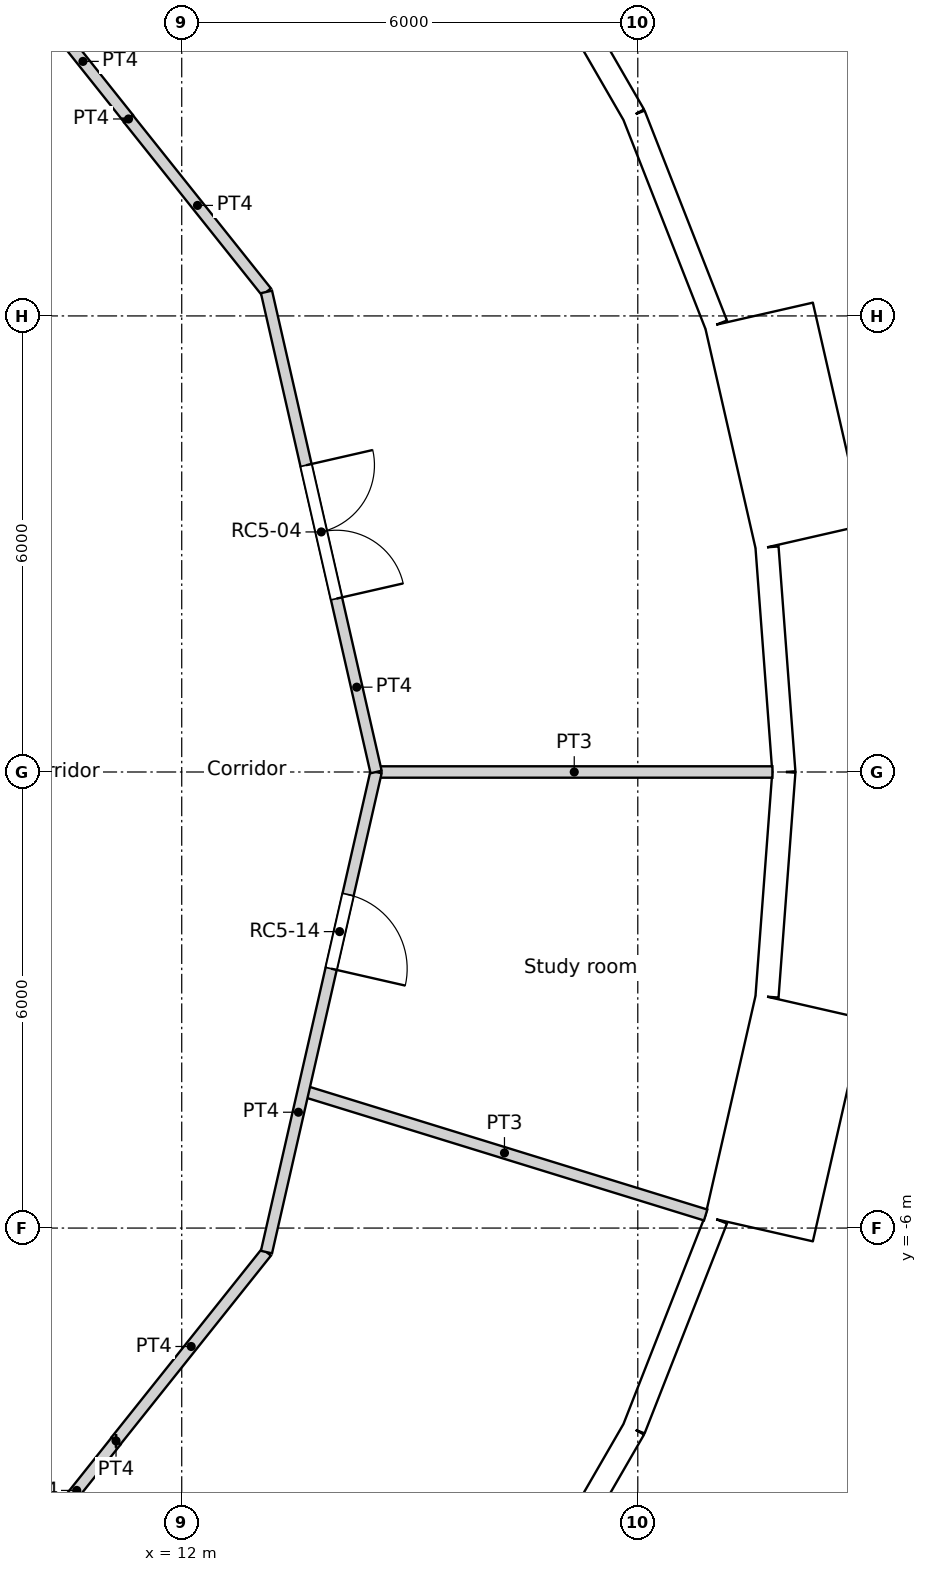
"""IFC4 building model, lengths in metres.
Left out: names, types, materials, properties, quantities, classifications, styles, units other than length and angle.
Written with IfcOpenShell. Run it as: python <this file> out.ifc"""

import sys

from ifc_helpers import new_model, si_unit, direction, frame, frame_2d, origin, origin_2d, place, context, subcontext, project, spatial, rectangle, circle, extrude, element, fill, save


model = new_model("IFC4")
c1 = context("Model", 3, precision=1e-05, world=origin(), true_north=direction((0.0, 1.0)))
c2 = subcontext(c1, "Body", "Model", "MODEL_VIEW")
j1 = project(units=[si_unit("LENGTHUNIT", "METRE"), si_unit("PLANEANGLEUNIT", "RADIAN")], contexts=[c1])
p1 = place(None, origin())
s1 = spatial("IfcSite", under=j1, at=p1, CompositionType="ELEMENT")
p2 = place(p1, origin())
s2 = spatial("IfcBuilding", under=s1, at=p2, CompositionType="ELEMENT")
p3 = place(p2, frame((0.0, 0.0, 270.6)))
s3 = spatial("IfcBuildingStorey", under=s2, at=p3, CompositionType="ELEMENT", Elevation=270.6)
for number, where, z_axis, x_axis in (
    (1, (18.822, 0.0, 0.0), (0.0, 0.0, 1.0), (1.0, 0.0, 0.0)),
    (2, (17.986, 5.548, 0.0), (0.0, 0.0, 1.0), (1.0, 0.0, 0.0)),
    (3, (17.986, -5.548, 0.0), (0.0, 0.0, 1.0), (1.0, 0.0, 0.0)),
):
    element("IfcColumn", number, at=place(p3, frame(where, z_axis=z_axis, x_axis=x_axis)), inside=s3, PredefinedType="COLUMN", context=c2, shape_type="SweptSolid", body=[
        extrude(circle(Radius=0.55, at=origin_2d()), origin(), (0.0, 0.0, 1.0), 3.6),
    ])
p4 = place(p3, frame((19.922, 0.0, 0.0), z_axis=(0.0, 0.0, 1.0), x_axis=(-0.074755115547, 0.997201921729, 0.0)))
e4 = element("IfcWall", 4, at=p4, inside=s3, PredefinedType="SOLIDWALL", context=c2, shape_type="SweptSolid", body=[
    extrude(rectangle(XDim=2.962, YDim=0.3, at=frame_2d((1.481, 0.0))), origin(), (0.0, 0.0, 1.0), 3.25),
])
p5 = place(p4, frame((1.481, 0.0, 1.55)))
e5 = element("IfcOpeningElement", 5, at=p5, cuts=e4, PredefinedType="OPENING", context=c2, shape_type="SweptSolid", body=[
    extrude(circle(Radius=0.9, at=origin_2d()), frame((0.0, 0.16, 0.0), z_axis=(0.0, -1.0, 0.0), x_axis=(1.0, 0.0, 0.0)), (0.0, 0.0, 1.0), 0.32),
])
p6 = place(p3, frame((20.262, 3.086, -0.35), z_axis=(0.0, 0.0, 1.0), x_axis=(-0.222570682856, 0.974916555985, 0.0)))
e6 = element("IfcWall", 6, at=p6, inside=s3, PredefinedType="ELEMENTEDWALL", context=c2, shape_type="SweptSolid", body=[
    extrude(rectangle(XDim=3.0, YDim=1.45, at=frame_2d((1.5, 0.0))), origin(), (0.0, 0.0, 1.0), 3.6),
])
p7 = place(p6, frame((1.5, 0.0, 1.9)))
e7 = element("IfcOpeningElement", 7, at=p7, cuts=e6, PredefinedType="OPENING", context=c2, shape_type="SweptSolid", body=[
    extrude(circle(Radius=0.9, at=origin_2d()), frame((0.0, 0.735, 0.0), z_axis=(0.0, -1.0, 0.0), x_axis=(1.0, 0.0, 0.0)), (0.0, 0.0, 1.0), 1.47),
])
p8 = place(p3, frame((19.031, 5.886, 0.0), z_axis=(0.0, 0.0, 1.0), x_axis=(-0.365343821297, 0.930872650925, 0.0)))
e8 = element("IfcWall", 8, at=p8, inside=s3, PredefinedType="SOLIDWALL", context=c2, shape_type="SweptSolid", body=[
    extrude(rectangle(XDim=2.962, YDim=0.3, at=frame_2d((1.481, 0.0))), origin(), (0.0, 0.0, 1.0), 3.25),
])
p9 = place(p8, frame((1.481, 0.0, 1.55)))
e9 = element("IfcOpeningElement", 9, at=p9, cuts=e8, PredefinedType="OPENING", context=c2, shape_type="SweptSolid", body=[
    extrude(circle(Radius=0.9, at=origin_2d()), frame((0.0, 0.16, 0.0), z_axis=(0.0, -1.0, 0.0), x_axis=(1.0, 0.0, 0.0)), (0.0, 0.0, 1.0), 0.32),
])
p10 = place(p3, frame((17.949, 8.644, 0.0), z_axis=(0.0, 0.0, 1.0), x_axis=(-0.500012570604, 0.866018146021, 0.0)))
e10 = element("IfcWall", 10, at=p10, inside=s3, PredefinedType="SOLIDWALL", context=c2, shape_type="SweptSolid", body=[
    extrude(rectangle(XDim=2.962, YDim=0.3, at=frame_2d((1.481, 0.0))), origin(), (0.0, 0.0, 1.0), 3.25),
])
p11 = place(p10, frame((1.481, 0.0, 1.55)))
e11 = element("IfcOpeningElement", 11, at=p11, cuts=e10, PredefinedType="OPENING", context=c2, shape_type="SweptSolid", body=[
    extrude(circle(Radius=0.9, at=origin_2d()), frame((0.0, 0.16, 0.0), z_axis=(0.0, -1.0, 0.0), x_axis=(1.0, 0.0, 0.0)), (0.0, 0.0, 1.0), 0.32),
])
p12 = place(p3, frame((16.468, -11.209, 0.0), z_axis=(0.0, 0.0, 1.0), x_axis=(0.500012570604, 0.866018146021, 0.0)))
e12 = element("IfcWall", 12, at=p12, inside=s3, PredefinedType="SOLIDWALL", context=c2, shape_type="SweptSolid", body=[
    extrude(rectangle(XDim=2.962, YDim=0.3, at=frame_2d((1.481, 0.0))), origin(), (0.0, 0.0, 1.0), 3.25),
])
p13 = place(p12, frame((1.481, 0.0, 1.55)))
e13 = element("IfcOpeningElement", 13, at=p13, cuts=e12, PredefinedType="OPENING", context=c2, shape_type="SweptSolid", body=[
    extrude(circle(Radius=0.9, at=origin_2d()), frame((0.0, 0.16, 0.0), z_axis=(0.0, -1.0, 0.0), x_axis=(1.0, 0.0, 0.0)), (0.0, 0.0, 1.0), 0.32),
])
p14 = place(p3, frame((17.949, -8.644, 0.0), z_axis=(0.0, 0.0, 1.0), x_axis=(0.365343821297, 0.930872650925, 0.0)))
e14 = element("IfcWall", 14, at=p14, inside=s3, PredefinedType="SOLIDWALL", context=c2, shape_type="SweptSolid", body=[
    extrude(rectangle(XDim=2.962, YDim=0.3, at=frame_2d((1.481, 0.0))), origin(), (0.0, 0.0, 1.0), 3.25),
])
p15 = place(p14, frame((1.481, 0.0, 1.55)))
e15 = element("IfcOpeningElement", 15, at=p15, cuts=e14, PredefinedType="OPENING", context=c2, shape_type="SweptSolid", body=[
    extrude(circle(Radius=0.9, at=origin_2d()), frame((0.0, 0.16, 0.0), z_axis=(0.0, -1.0, 0.0), x_axis=(1.0, 0.0, 0.0)), (0.0, 0.0, 1.0), 0.32),
])
p16 = place(p3, frame((19.595, -6.011, -0.35), z_axis=(0.0, 0.0, 1.0), x_axis=(0.222570682856, 0.974916555985, 0.0)))
e16 = element("IfcWall", 16, at=p16, inside=s3, PredefinedType="ELEMENTEDWALL", context=c2, shape_type="SweptSolid", body=[
    extrude(rectangle(XDim=3.0, YDim=1.45, at=frame_2d((1.5, 0.0))), origin(), (0.0, 0.0, 1.0), 3.6),
])
p17 = place(p16, frame((1.5, 0.0, 1.9)))
e17 = element("IfcOpeningElement", 17, at=p17, cuts=e16, PredefinedType="OPENING", context=c2, shape_type="SweptSolid", body=[
    extrude(circle(Radius=0.9, at=origin_2d()), frame((0.0, 0.735, 0.0), z_axis=(0.0, -1.0, 0.0), x_axis=(1.0, 0.0, 0.0)), (0.0, 0.0, 1.0), 1.47),
])
p18 = place(p3, frame((19.7, -2.954, 0.0), z_axis=(0.0, 0.0, 1.0), x_axis=(0.074755115547, 0.997201921729, 0.0)))
e18 = element("IfcWall", 18, at=p18, inside=s3, PredefinedType="SOLIDWALL", context=c2, shape_type="SweptSolid", body=[
    extrude(rectangle(XDim=2.962, YDim=0.3, at=frame_2d((1.481, 0.0))), origin(), (0.0, 0.0, 1.0), 3.25),
])
p19 = place(p18, frame((1.481, 0.0, 1.55)))
e19 = element("IfcOpeningElement", 19, at=p19, cuts=e18, PredefinedType="OPENING", context=c2, shape_type="SweptSolid", body=[
    extrude(circle(Radius=0.9, at=origin_2d()), frame((0.0, 0.16, 0.0), z_axis=(0.0, -1.0, 0.0), x_axis=(1.0, 0.0, 0.0)), (0.0, 0.0, 1.0), 0.32),
])
p20 = place(p3, frame((10.101, 10.101, 0.0), z_axis=(0.0, 0.0, 1.0), x_axis=(0.623130947784, -0.782117524362, 0.0)))
e20 = element("IfcWall", 20, at=p20, inside=s3, PredefinedType="PARTITIONING", context=c2, shape_type="SweptSolid", body=[
    extrude(rectangle(XDim=1.924, YDim=0.15, at=frame_2d((0.962, 0.0))), origin(), (0.0, 0.0, 1.0), 3.1),
])
p21 = place(p3, frame((11.3, 8.586, 0.0), z_axis=(0.0, 0.0, 1.0), x_axis=(0.0, 1.0, 0.0)))
e21 = element("IfcWall", 21, at=p21, inside=s3, PredefinedType="PARTITIONING", context=c2, shape_type="SweptSolid", body=[
    extrude(rectangle(XDim=0.01, YDim=0.15, at=frame_2d((0.005, 0.0))), origin(), (0.0, 0.0, 1.0), 3.1),
])
p22 = place(p3, frame((11.137, -8.8, 0.0), z_axis=(0.0, 0.0, 1.0), x_axis=(-1.0, 0.0, 0.0)))
e22 = element("IfcWall", 22, at=p22, inside=s3, PredefinedType="PARTITIONING", context=c2, shape_type="SweptSolid", body=[
    extrude(rectangle(XDim=0.003, YDim=0.15, at=frame_2d((0.001, 0.0))), origin(), (0.0, 0.0, 1.0), 3.1),
])
p23 = place(p3, frame((10.101, -10.101, 0.0), z_axis=(0.0, 0.0, 1.0), x_axis=(0.623098344652, 0.782143498913, 0.0)))
e23 = element("IfcWall", 23, at=p23, inside=s3, PredefinedType="PARTITIONING", context=c2, shape_type="SweptSolid", body=[
    extrude(rectangle(XDim=1.661, YDim=0.15, at=frame_2d((0.831, 0.0))), origin(), (0.0, 0.0, 1.0), 3.1),
])
p24 = place(p3, frame((11.3, 8.592, 0.0), z_axis=(0.0, 0.0, 1.0), x_axis=(0.623446514299, -0.781866001185, 0.0)))
e24 = element("IfcWall", 24, at=p24, inside=s3, PredefinedType="PARTITIONING", context=c2, shape_type="SweptSolid", body=[
    extrude(rectangle(XDim=2.911, YDim=0.15, at=frame_2d((1.456, 0.0))), origin(), (0.0, 0.0, 1.0), 3.1),
])
p25 = place(p3, frame((13.115, 6.316, 0.0), z_axis=(0.0, 0.0, 1.0), x_axis=(0.222568978642, -0.97491694505, 0.0)))
e25 = element("IfcWall", 25, at=p25, inside=s3, PredefinedType="PARTITIONING", context=c2, shape_type="SweptSolid", body=[
    extrude(rectangle(XDim=6.479, YDim=0.15, at=frame_2d((3.239, 0.0))), origin(), (0.0, 0.0, 1.0), 3.1),
])
p26 = place(p25, frame((2.339, 0.0, 0.0)))
e26 = element("IfcOpeningElement", 26, at=p26, cuts=e25, PredefinedType="OPENING", context=c2, shape_type="SweptSolid", body=[
    extrude(rectangle(XDim=1.8, YDim=2.1, at=frame_2d((0.9, 1.05))), frame((0.0, 0.075, 0.0), z_axis=(0.0, -1.0, 0.0), x_axis=(1.0, 0.0, 0.0)), (0.0, 0.0, 1.0), 0.15),
])
p27 = place(p3, frame((13.115, -6.316, 0.0), z_axis=(0.0, 0.0, 1.0), x_axis=(0.222533159771, 0.974925121639, 0.0)))
e27 = element("IfcWall", 27, at=p27, inside=s3, PredefinedType="PARTITIONING", context=c2, shape_type="SweptSolid", body=[
    extrude(rectangle(XDim=6.478, YDim=0.15, at=frame_2d((3.239, 0.0))), origin(), (0.0, 0.0, 1.0), 3.1),
])
p28 = place(p27, frame((3.824, 0.0, 0.0)))
e28 = element("IfcOpeningElement", 28, at=p28, cuts=e27, PredefinedType="OPENING", context=c2, shape_type="SweptSolid", body=[
    extrude(rectangle(XDim=1.0, YDim=2.04, at=frame_2d((0.5, 1.02))), frame((0.0, 0.075, 0.0), z_axis=(0.0, -1.0, 0.0), x_axis=(1.0, 0.0, 0.0)), (0.0, 0.0, 1.0), 0.15),
])
p29 = place(p3, frame((11.134, -8.8, 0.0), z_axis=(0.0, 0.0, 1.0), x_axis=(0.623476099415, 0.781842409606, 0.0)))
e29 = element("IfcWall", 29, at=p29, inside=s3, PredefinedType="PARTITIONING", context=c2, shape_type="SweptSolid", body=[
    extrude(rectangle(XDim=3.177, YDim=0.15, at=frame_2d((1.589, 0.0))), origin(), (0.0, 0.0, 1.0), 3.1),
])
p30 = place(p3, frame((14.557, 0.0, 0.0), z_axis=(0.0, 0.0, 1.0), x_axis=(1.0, 0.0, 0.0)))
e30 = element("IfcWall", 30, at=p30, inside=s3, PredefinedType="PARTITIONING", context=c2, shape_type="SweptSolid", body=[
    extrude(rectangle(XDim=5.214, YDim=0.15, at=frame_2d((2.607, 0.0))), origin(), (0.0, 0.0, 1.0), 3.1),
])
p31 = place(p3, frame((13.599, -4.195, 0.0), z_axis=(0.0, 0.0, 1.0), x_axis=(0.955580602693, -0.294729896274, 0.0)))
e31 = element("IfcWall", 31, at=p31, inside=s3, PredefinedType="PARTITIONING", context=c2, shape_type="SweptSolid", body=[
    extrude(rectangle(XDim=5.54, YDim=0.15, at=frame_2d((2.77, 0.0))), origin(), (0.0, 0.0, 1.0), 3.1),
])
p32 = place(p5, origin())
e32 = element("IfcWindow", 32, at=p32, inside=s3, PartitioningType="SINGLE_PANEL", PredefinedType="WINDOW", context=c2, shape_type="SweptSolid", body=[
    extrude(circle(Radius=0.9, at=origin_2d()), frame((0.0, 0.12, 0.0), z_axis=(0.0, -1.0, 0.0), x_axis=(1.0, 0.0, 0.0)), (0.0, 0.0, 1.0), 0.1),
])
fill(e5, e32)
p33 = place(p7, origin())
e33 = element("IfcWindow", 33, at=p33, inside=s3, PartitioningType="SINGLE_PANEL", PredefinedType="WINDOW", context=c2, shape_type="SweptSolid", body=[
    extrude(circle(Radius=0.9, at=origin_2d()), frame((0.0, 0.695, 0.0), z_axis=(0.0, -1.0, 0.0), x_axis=(1.0, 0.0, 0.0)), (0.0, 0.0, 1.0), 0.1),
])
fill(e7, e33)
p34 = place(p9, origin())
e34 = element("IfcWindow", 34, at=p34, inside=s3, PartitioningType="SINGLE_PANEL", PredefinedType="WINDOW", context=c2, shape_type="SweptSolid", body=[
    extrude(circle(Radius=0.9, at=origin_2d()), frame((0.0, 0.12, 0.0), z_axis=(0.0, -1.0, 0.0), x_axis=(1.0, 0.0, 0.0)), (0.0, 0.0, 1.0), 0.1),
])
fill(e9, e34)
p35 = place(p11, origin())
e35 = element("IfcWindow", 35, at=p35, inside=s3, PartitioningType="SINGLE_PANEL", PredefinedType="WINDOW", context=c2, shape_type="SweptSolid", body=[
    extrude(circle(Radius=0.9, at=origin_2d()), frame((0.0, 0.12, 0.0), z_axis=(0.0, -1.0, 0.0), x_axis=(1.0, 0.0, 0.0)), (0.0, 0.0, 1.0), 0.1),
])
fill(e11, e35)
p36 = place(p13, origin())
e36 = element("IfcWindow", 36, at=p36, inside=s3, PartitioningType="SINGLE_PANEL", PredefinedType="WINDOW", context=c2, shape_type="SweptSolid", body=[
    extrude(circle(Radius=0.9, at=origin_2d()), frame((0.0, 0.12, 0.0), z_axis=(0.0, -1.0, 0.0), x_axis=(1.0, 0.0, 0.0)), (0.0, 0.0, 1.0), 0.1),
])
fill(e13, e36)
p37 = place(p15, origin())
e37 = element("IfcWindow", 37, at=p37, inside=s3, PartitioningType="SINGLE_PANEL", PredefinedType="WINDOW", context=c2, shape_type="SweptSolid", body=[
    extrude(circle(Radius=0.9, at=origin_2d()), frame((0.0, 0.12, 0.0), z_axis=(0.0, -1.0, 0.0), x_axis=(1.0, 0.0, 0.0)), (0.0, 0.0, 1.0), 0.1),
])
fill(e15, e37)
p38 = place(p17, origin())
e38 = element("IfcWindow", 38, at=p38, inside=s3, PartitioningType="SINGLE_PANEL", PredefinedType="WINDOW", context=c2, shape_type="SweptSolid", body=[
    extrude(circle(Radius=0.9, at=origin_2d()), frame((0.0, 0.695, 0.0), z_axis=(0.0, -1.0, 0.0), x_axis=(1.0, 0.0, 0.0)), (0.0, 0.0, 1.0), 0.1),
])
fill(e17, e38)
p39 = place(p19, origin())
e39 = element("IfcWindow", 39, at=p39, inside=s3, PartitioningType="SINGLE_PANEL", PredefinedType="WINDOW", context=c2, shape_type="SweptSolid", body=[
    extrude(circle(Radius=0.9, at=origin_2d()), frame((0.0, 0.12, 0.0), z_axis=(0.0, -1.0, 0.0), x_axis=(1.0, 0.0, 0.0)), (0.0, 0.0, 1.0), 0.1),
])
fill(e19, e39)
p40 = place(p26, origin())
e40 = element("IfcDoor", 40, at=p40, inside=s3, OperationType="DOUBLE_DOOR_SINGLE_SWING", PredefinedType="DOOR", context=c2, shape_type="SweptSolid", body=[
    extrude(rectangle(XDim=1.8, YDim=2.1, at=frame_2d((0.9, 1.05))), frame((0.0, 0.025, 0.0), z_axis=(0.0, -1.0, 0.0), x_axis=(1.0, 0.0, 0.0)), (0.0, 0.0, 1.0), 0.05),
])
fill(e26, e40)
p41 = place(p28, origin())
e41 = element("IfcDoor", 41, at=p41, inside=s3, OperationType="SINGLE_SWING_RIGHT", PredefinedType="DOOR", context=c2, shape_type="SweptSolid", body=[
    extrude(rectangle(XDim=1.0, YDim=2.04, at=frame_2d((0.5, 1.02))), frame((0.0, 0.025, 0.0), z_axis=(0.0, -1.0, 0.0), x_axis=(1.0, 0.0, 0.0)), (0.0, 0.0, 1.0), 0.05),
])
fill(e28, e41)
save(model, sys.argv[1])
